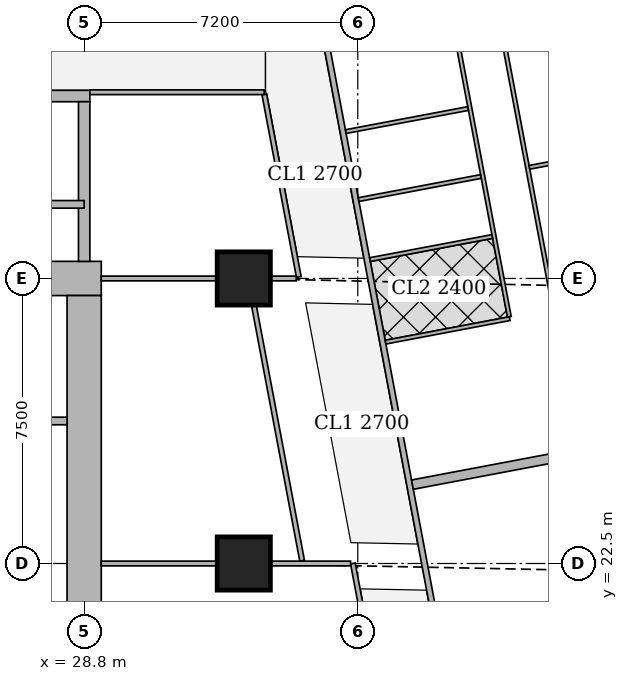
"""IFC4 building model, lengths in metres.
Left out: names, types, materials, properties, quantities, classifications, styles, units other than length and angle.
Written with IfcOpenShell. Run it as: python <this file> out.ifc"""

import sys

from ifc_helpers import new_model, si_unit, direction, frame, frame_2d, origin, origin_2d, place, context, subcontext, project, spatial, rectangle, extrude, element, fill, save


model = new_model("IFC4")
c1 = context("Model", 3, precision=1e-05, world=origin(), true_north=direction((0.0, 1.0)))
c2 = subcontext(c1, "Body", "Model", "MODEL_VIEW")
j1 = project(units=[si_unit("LENGTHUNIT", "METRE"), si_unit("PLANEANGLEUNIT", "RADIAN")], contexts=[c1])
p1 = place(None, origin())
s1 = spatial("IfcSite", under=j1, at=p1, CompositionType="ELEMENT")
p2 = place(p1, origin())
s2 = spatial("IfcBuilding", under=s1, at=p2, CompositionType="ELEMENT")
p3 = place(p2, frame((0.0, 0.0, 193.7)))
s3 = spatial("IfcBuildingStorey", under=s2, at=p3, CompositionType="ELEMENT", Elevation=193.7)
for number, where, z_axis, x_axis in (
    (1, (33.0, 22.5, 0.0), (0.0, 0.0, 1.0), (1.0, 0.0, 0.0)),
    (2, (33.0, 30.0, 0.0), (0.0, 0.0, 1.0), (1.0, 0.0, 0.0)),
):
    element("IfcColumn", number, at=place(p3, frame(where, z_axis=z_axis, x_axis=x_axis)), inside=s3, PredefinedType="COLUMN", context=c2, shape_type="SweptSolid", body=[
        extrude(rectangle(XDim=1.4, YDim=1.4, at=origin_2d()), origin(), (0.0, 0.0, 1.0), 3.75),
    ])
p4 = place(p3, frame((13.95, 30.0, 0.0), z_axis=(0.0, 0.0, 1.0), x_axis=(1.0, 0.0, 0.0)))
e3 = element("IfcWall", 3, at=p4, inside=s3, PredefinedType="SHEAR", context=c2, shape_type="SweptSolid", body=[
    extrude(rectangle(XDim=15.3, YDim=0.9, at=frame_2d((7.65, 0.0))), origin(), (0.0, 0.0, 1.0), 3.75),
])
p5 = place(p4, frame((4.45, 0.0, 0.0)))
e4 = element("IfcOpeningElement", 4, at=p5, cuts=e3, PredefinedType="OPENING", context=c2, shape_type="SweptSolid", body=[
    extrude(rectangle(XDim=1.8, YDim=2.1, at=frame_2d((0.9, 1.05))), frame((0.0, 0.46, 0.0), z_axis=(0.0, -1.0, 0.0), x_axis=(1.0, 0.0, 0.0)), (0.0, 0.0, 1.0), 0.92),
])
p6 = place(p4, frame((10.7, 0.0, 0.0)))
e5 = element("IfcOpeningElement", 5, at=p6, cuts=e3, PredefinedType="OPENING", context=c2, shape_type="SweptSolid", body=[
    extrude(rectangle(XDim=1.1, YDim=2.1, at=frame_2d((0.55, 1.05))), frame((0.0, 0.46, 0.0), z_axis=(0.0, -1.0, 0.0), x_axis=(1.0, 0.0, 0.0)), (0.0, 0.0, 1.0), 0.92),
])
p7 = place(p3, frame((28.8, 15.45, 0.0), z_axis=(0.0, 0.0, 1.0), x_axis=(0.0, 1.0, 0.0)))
e6 = element("IfcWall", 6, at=p7, inside=s3, PredefinedType="SHEAR", context=c2, shape_type="SweptSolid", body=[
    extrude(rectangle(XDim=14.1, YDim=0.9, at=frame_2d((7.05, 0.0))), origin(), (0.0, 0.0, 1.0), 3.75),
])
p8 = place(p3, frame((21.45, 34.8, 0.0), z_axis=(0.0, 0.0, 1.0), x_axis=(1.0, 0.0, 0.0)))
e7 = element("IfcWall", 7, at=p8, inside=s3, PredefinedType="SHEAR", context=c2, shape_type="SweptSolid", body=[
    extrude(rectangle(XDim=7.5, YDim=0.3, at=frame_2d((3.75, 0.0))), origin(), (0.0, 0.0, 1.0), 3.75),
])
p9 = place(p8, frame((0.5, 0.0, 0.0)))
e8 = element("IfcOpeningElement", 8, at=p9, cuts=e7, PredefinedType="OPENING", context=c2, shape_type="SweptSolid", body=[
    extrude(rectangle(XDim=1.1, YDim=2.1, at=frame_2d((0.55, 1.05))), frame((0.0, 0.16, 0.0), z_axis=(0.0, -1.0, 0.0), x_axis=(1.0, 0.0, 0.0)), (0.0, 0.0, 1.0), 0.32),
])
p10 = place(p3, frame((28.8, 30.45, 0.0), z_axis=(0.0, 0.0, 1.0), x_axis=(0.0, 1.0, 0.0)))
e9 = element("IfcWall", 9, at=p10, inside=s3, PredefinedType="SHEAR", context=c2, shape_type="SweptSolid", body=[
    extrude(rectangle(XDim=4.2, YDim=0.3, at=frame_2d((2.1, 0.0))), origin(), (0.0, 0.0, 1.0), 3.75),
])
p11 = place(p3, frame((33.933, 42.73, 0.0), z_axis=(0.0, 0.0, 1.0), x_axis=(0.185595417643, -0.982626246825, 0.0)))
e10 = element("IfcWall", 10, at=p11, inside=s3, PredefinedType="SOLIDWALL", context=c2, shape_type="SweptSolid", body=[
    extrude(rectangle(XDim=41.051, YDim=0.15, at=frame_2d((20.525, 0.0))), origin(), (0.0, 0.0, 1.0), 2.5),
])
p12 = place(p11, frame((16.082, 0.0, 0.0)))
e11 = element("IfcOpeningElement", 11, at=p12, cuts=e10, PredefinedType="OPENING", context=c2, shape_type="SweptSolid", body=[
    extrude(rectangle(XDim=1.0, YDim=2.1, at=frame_2d((0.5, 1.05))), frame((0.0, 0.085, 0.0), z_axis=(0.0, -1.0, 0.0), x_axis=(1.0, 0.0, 0.0)), (0.0, 0.0, 1.0), 0.17),
])
p13 = place(p11, frame((19.898, 0.0, 0.0)))
e12 = element("IfcOpeningElement", 12, at=p13, cuts=e10, PredefinedType="OPENING", context=c2, shape_type="SweptSolid", body=[
    extrude(rectangle(XDim=1.0, YDim=2.1, at=frame_2d((0.5, 1.05))), frame((0.0, 0.085, 0.0), z_axis=(0.0, -1.0, 0.0), x_axis=(1.0, 0.0, 0.0)), (0.0, 0.0, 1.0), 0.17),
])
p14 = place(p11, frame((30.862, 0.0, 0.0)))
e13 = element("IfcOpeningElement", 13, at=p14, cuts=e10, PredefinedType="OPENING", context=c2, shape_type="SweptSolid", body=[
    extrude(rectangle(XDim=1.0, YDim=2.1, at=frame_2d((0.5, 1.05))), frame((0.0, 0.085, 0.0), z_axis=(0.0, -1.0, 0.0), x_axis=(1.0, 0.0, 0.0)), (0.0, 0.0, 1.0), 0.17),
])
p15 = place(p3, frame((38.764, 41.941, 0.0), z_axis=(0.0, 0.0, 1.0), x_axis=(0.185512176227, -0.982641965556, 0.0)))
e14 = element("IfcWall", 14, at=p15, inside=s3, PredefinedType="PARTITIONING", context=c2, shape_type="SweptSolid", body=[
    extrude(rectangle(XDim=12.792, YDim=0.1, at=frame_2d((6.396, 0.0))), origin(), (0.0, 0.0, 1.0), 2.5),
])
p16 = place(p15, frame((11.35, 0.0, 0.0)))
e15 = element("IfcOpeningElement", 15, at=p16, cuts=e14, PredefinedType="OPENING", context=c2, shape_type="SweptSolid", body=[
    extrude(rectangle(XDim=0.9, YDim=2.1, at=frame_2d((0.45, 1.05))), frame((0.0, 0.06, 0.0), z_axis=(0.0, -1.0, 0.0), x_axis=(1.0, 0.0, 0.0)), (0.0, 0.0, 1.0), 0.12),
])
p17 = place(p15, frame((8.085, 0.0, 0.0)))
e16 = element("IfcOpeningElement", 16, at=p17, cuts=e14, PredefinedType="OPENING", context=c2, shape_type="SweptSolid", body=[
    extrude(rectangle(XDim=0.9, YDim=2.1, at=frame_2d((0.45, 1.05))), frame((0.0, 0.06, 0.0), z_axis=(0.0, -1.0, 0.0), x_axis=(1.0, 0.0, 0.0)), (0.0, 0.0, 1.0), 0.12),
])
p18 = place(p15, frame((3.7, 0.0, 0.0)))
e17 = element("IfcOpeningElement", 17, at=p18, cuts=e14, PredefinedType="OPENING", context=c2, shape_type="SweptSolid", body=[
    extrude(rectangle(XDim=0.9, YDim=2.1, at=frame_2d((0.45, 1.05))), frame((0.0, 0.06, 0.0), z_axis=(0.0, -1.0, 0.0), x_axis=(1.0, 0.0, 0.0)), (0.0, 0.0, 1.0), 0.12),
])
p19 = place(p3, frame((37.473, 42.309, 0.0), z_axis=(0.0, 0.0, 1.0), x_axis=(0.185570636839, -0.982630927024, 0.0)))
e18 = element("IfcWall", 18, at=p19, inside=s3, PredefinedType="PARTITIONING", context=c2, shape_type="SweptSolid", body=[
    extrude(rectangle(XDim=13.553, YDim=0.1, at=frame_2d((6.777, 0.0))), origin(), (0.0, 0.0, 1.0), 2.5),
])
p20 = place(p19, frame((12.049, 0.0, 0.0)))
e19 = element("IfcOpeningElement", 19, at=p20, cuts=e18, PredefinedType="OPENING", context=c2, shape_type="SweptSolid", body=[
    extrude(rectangle(XDim=0.9, YDim=2.1, at=frame_2d((0.45, 1.05))), frame((0.0, 0.06, 0.0), z_axis=(0.0, -1.0, 0.0), x_axis=(1.0, 0.0, 0.0)), (0.0, 0.0, 1.0), 0.12),
])
p21 = place(p19, frame((8.427, 0.0, 0.0)))
e20 = element("IfcOpeningElement", 20, at=p21, cuts=e18, PredefinedType="OPENING", context=c2, shape_type="SweptSolid", body=[
    extrude(rectangle(XDim=0.9, YDim=2.1, at=frame_2d((0.45, 1.05))), frame((0.0, 0.06, 0.0), z_axis=(0.0, -1.0, 0.0), x_axis=(1.0, 0.0, 0.0)), (0.0, 0.0, 1.0), 0.12),
])
p22 = place(p19, frame((2.853, 0.0, 0.0)))
e21 = element("IfcOpeningElement", 21, at=p22, cuts=e18, PredefinedType="OPENING", context=c2, shape_type="SweptSolid", body=[
    extrude(rectangle(XDim=0.9, YDim=2.1, at=frame_2d((0.45, 1.05))), frame((0.0, 0.06, 0.0), z_axis=(0.0, -1.0, 0.0), x_axis=(1.0, 0.0, 0.0)), (0.0, 0.0, 1.0), 0.12),
])
p23 = place(p19, frame((10.14, 0.0, 0.0)))
e22 = element("IfcOpeningElement", 22, at=p23, cuts=e18, PredefinedType="OPENING", context=c2, shape_type="SweptSolid", body=[
    extrude(rectangle(XDim=0.9, YDim=2.1, at=frame_2d((0.45, 1.05))), frame((0.0, 0.06, 0.0), z_axis=(0.0, -1.0, 0.0), x_axis=(1.0, 0.0, 0.0)), (0.0, 0.0, 1.0), 0.12),
])
p24 = place(p19, frame((5.759, 0.0, 0.0)))
e23 = element("IfcOpeningElement", 23, at=p24, cuts=e18, PredefinedType="OPENING", context=c2, shape_type="SweptSolid", body=[
    extrude(rectangle(XDim=0.9, YDim=2.1, at=frame_2d((0.45, 1.05))), frame((0.0, 0.06, 0.0), z_axis=(0.0, -1.0, 0.0), x_axis=(1.0, 0.0, 0.0)), (0.0, 0.0, 1.0), 0.12),
])
p25 = place(p3, frame((44.693, 33.713, 0.0), z_axis=(0.0, 0.0, 1.0), x_axis=(-0.982623519589, -0.185609856287, 0.0)))
e24 = element("IfcWall", 24, at=p25, inside=s3, PredefinedType="PARTITIONING", context=c2, shape_type="SweptSolid", body=[
    extrude(rectangle(XDim=4.25, YDim=0.1, at=frame_2d((2.125, 0.0))), origin(), (0.0, 0.0, 1.0), 2.05),
])
p26 = place(p3, frame((39.24, 32.683, 0.0), z_axis=(0.0, 0.0, 1.0), x_axis=(-0.982607026909, -0.185697147715, 0.0)))
e25 = element("IfcWall", 25, at=p26, inside=s3, PredefinedType="PARTITIONING", context=c2, shape_type="SweptSolid", body=[
    extrude(rectangle(XDim=3.275, YDim=0.1, at=frame_2d((1.637, 0.0))), origin(), (0.0, 0.0, 1.0), 3.5),
])
p27 = place(p3, frame((39.997, 28.942, 0.0), z_axis=(0.0, 0.0, 1.0), x_axis=(-0.982569883123, -0.185893584556, 0.0)))
e26 = element("IfcWall", 26, at=p27, inside=s3, PredefinedType="PARTITIONING", context=c2, shape_type="SweptSolid", body=[
    extrude(rectangle(XDim=3.324, YDim=0.1, at=frame_2d((1.662, 0.0))), origin(), (0.0, 0.0, 1.0), 3.5),
])
p28 = place(p3, frame((39.538, 31.104, 0.0), z_axis=(0.0, 0.0, 1.0), x_axis=(-0.982620626894, -0.185625169636, 0.0)))
e27 = element("IfcWall", 27, at=p28, inside=s3, PredefinedType="PARTITIONING", context=c2, shape_type="SweptSolid", body=[
    extrude(rectangle(XDim=3.275, YDim=0.1, at=frame_2d((1.637, 0.0))), origin(), (0.0, 0.0, 1.0), 2.5),
])
p29 = place(p3, frame((38.902, 34.471, 0.0), z_axis=(0.0, 0.0, 1.0), x_axis=(-0.982674977865, -0.185337227447, 0.0)))
e28 = element("IfcWall", 28, at=p29, inside=s3, PredefinedType="PARTITIONING", context=c2, shape_type="SweptSolid", body=[
    extrude(rectangle(XDim=3.275, YDim=0.1, at=frame_2d((1.637, 0.0))), origin(), (0.0, 0.0, 1.0), 3.5),
])
p30 = place(p3, frame((41.885, 25.415, 0.0), z_axis=(0.0, 0.0, 1.0), x_axis=(-0.982612837616, -0.185666398014, 0.0)))
e29 = element("IfcWall", 29, at=p30, inside=s3, PredefinedType="SOLIDWALL", context=c2, shape_type="SweptSolid", body=[
    extrude(rectangle(XDim=4.525, YDim=0.25, at=frame_2d((2.262, 0.0))), origin(), (0.0, 0.0, 1.0), 3.5),
])
p31 = place(p3, frame((28.95, 34.9, 0.0), z_axis=(0.0, 0.0, 1.0), x_axis=(1.0, 0.0, 0.0)))
e30 = element("IfcWall", 30, at=p31, inside=s3, PredefinedType="PARTITIONING", context=c2, shape_type="SweptSolid", body=[
    extrude(rectangle(XDim=4.588, YDim=0.125, at=frame_2d((2.294, 0.0))), origin(), (0.0, 0.0, 1.0), 3.5),
])
p32 = place(p3, frame((38.202, 10.163, 0.0), z_axis=(0.0, 0.0, 1.0), x_axis=(-0.185645577403, 0.982616771479, 0.0)))
e31 = element("IfcWall", 31, at=p32, inside=s3, PredefinedType="PARTITIONING", context=c2, shape_type="SweptSolid", body=[
    extrude(rectangle(XDim=12.555, YDim=0.125, at=frame_2d((6.278, 0.0))), origin(), (0.0, 0.0, 1.0), 2.5),
])
p33 = place(p32, frame((0.708, 0.0, 0.0)))
e32 = element("IfcOpeningElement", 32, at=p33, cuts=e31, PredefinedType="OPENING", context=c2, shape_type="SweptSolid", body=[
    extrude(rectangle(XDim=1.0, YDim=2.1, at=frame_2d((0.5, 1.05))), frame((0.0, 0.073, 0.0), z_axis=(0.0, -1.0, 0.0), x_axis=(1.0, 0.0, 0.0)), (0.0, 0.0, 1.0), 0.145),
])
p34 = place(p32, frame((5.9, 0.0, 0.0)))
e33 = element("IfcOpeningElement", 33, at=p34, cuts=e31, PredefinedType="OPENING", context=c2, shape_type="SweptSolid", body=[
    extrude(rectangle(XDim=1.0, YDim=2.1, at=frame_2d((0.5, 1.05))), frame((0.0, 0.073, 0.0), z_axis=(0.0, -1.0, 0.0), x_axis=(1.0, 0.0, 0.0)), (0.0, 0.0, 1.0), 0.145),
])
p35 = place(p32, frame((9.562, 0.0, 0.0)))
e34 = element("IfcOpeningElement", 34, at=p35, cuts=e31, PredefinedType="OPENING", context=c2, shape_type="SweptSolid", body=[
    extrude(rectangle(XDim=1.0, YDim=2.1, at=frame_2d((0.5, 1.05))), frame((0.0, 0.073, 0.0), z_axis=(0.0, -1.0, 0.0), x_axis=(1.0, 0.0, 0.0)), (0.0, 0.0, 1.0), 0.145),
])
p36 = place(p3, frame((34.448, 30.04, 0.0), z_axis=(0.0, 0.0, 1.0), x_axis=(-0.185749459238, 0.982597139418, 0.0)))
e35 = element("IfcWall", 35, at=p36, inside=s3, PredefinedType="PARTITIONING", context=c2, shape_type="SweptSolid", body=[
    extrude(rectangle(XDim=4.883, YDim=0.125, at=frame_2d((2.441, 0.0))), origin(), (0.0, 0.0, 1.0), 2.5),
])
p37 = place(p36, frame((0.95, 0.0, 0.0)))
e36 = element("IfcOpeningElement", 36, at=p37, cuts=e35, PredefinedType="OPENING", context=c2, shape_type="SweptSolid", body=[
    extrude(rectangle(XDim=1.0, YDim=2.1, at=frame_2d((0.5, 1.05))), frame((0.0, 0.073, 0.0), z_axis=(0.0, -1.0, 0.0), x_axis=(1.0, 0.0, 0.0)), (0.0, 0.0, 1.0), 0.145),
])
p38 = place(p3, frame((34.535, 22.574, 0.0), z_axis=(0.0, 0.0, 1.0), x_axis=(-0.185576487128, 0.982629822174, 0.0)))
e37 = element("IfcWall", 37, at=p38, inside=s3, PredefinedType="PARTITIONING", context=c2, shape_type="SweptSolid", body=[
    extrude(rectangle(XDim=6.832, YDim=0.125, at=frame_2d((3.416, 0.0))), origin(), (0.0, 0.0, 1.0), 2.5),
])
p39 = place(p38, frame((3.241, 0.0, 0.0)))
e38 = element("IfcOpeningElement", 38, at=p39, cuts=e37, PredefinedType="OPENING", context=c2, shape_type="SweptSolid", body=[
    extrude(rectangle(XDim=1.0, YDim=2.1, at=frame_2d((0.5, 1.05))), frame((0.0, 0.073, 0.0), z_axis=(0.0, -1.0, 0.0), x_axis=(1.0, 0.0, 0.0)), (0.0, 0.0, 1.0), 0.145),
])
p40 = place(p3, frame((29.25, 22.5, 0.0), z_axis=(0.0, 0.0, 1.0), x_axis=(1.0, 0.0, 0.0)))
e39 = element("IfcWall", 39, at=p40, inside=s3, PredefinedType="PARTITIONING", context=c2, shape_type="SweptSolid", body=[
    extrude(rectangle(XDim=3.049, YDim=0.125, at=frame_2d((1.524, 0.0))), origin(), (0.0, 0.0, 1.0), 3.5),
])
p41 = place(p3, frame((33.701, 22.5, 0.0), z_axis=(0.0, 0.0, 1.0), x_axis=(1.0, 0.0, 0.0)))
e40 = element("IfcWall", 40, at=p41, inside=s3, PredefinedType="PARTITIONING", context=c2, shape_type="SweptSolid", body=[
    extrude(rectangle(XDim=2.109, YDim=0.125, at=frame_2d((1.055, 0.0))), origin(), (0.0, 0.0, 1.0), 2.5),
])
p42 = place(p3, frame((29.25, 30.0, 0.0), z_axis=(0.0, 0.0, 1.0), x_axis=(1.0, 0.0, 0.0)))
e41 = element("IfcWall", 41, at=p42, inside=s3, PredefinedType="PARTITIONING", context=c2, shape_type="SweptSolid", body=[
    extrude(rectangle(XDim=3.049, YDim=0.125, at=frame_2d((1.524, 0.0))), origin(), (0.0, 0.0, 1.0), 3.5),
])
p43 = place(p3, frame((33.701, 30.0, 0.0), z_axis=(0.0, 0.0, 1.0), x_axis=(1.0, 0.0, 0.0)))
e42 = element("IfcWall", 42, at=p43, inside=s3, PredefinedType="PARTITIONING", context=c2, shape_type="SweptSolid", body=[
    extrude(rectangle(XDim=0.679, YDim=0.125, at=frame_2d((0.339, 0.0))), origin(), (0.0, 0.0, 1.0), 2.5),
])
p44 = place(p3, frame((23.0, 31.95, 0.0), z_axis=(0.0, 0.0, 1.0), x_axis=(1.0, 0.0, 0.0)))
e43 = element("IfcWall", 43, at=p44, inside=s3, PredefinedType="SHEAR", context=c2, shape_type="SweptSolid", body=[
    extrude(rectangle(XDim=5.8, YDim=0.2, at=frame_2d((2.9, 0.0))), origin(), (0.0, 0.0, 1.0), 3.75),
])
p45 = place(p3, frame((27.4, 26.25, 0.0), z_axis=(0.0, 0.0, 1.0), x_axis=(1.0, 0.0, 0.0)))
e44 = element("IfcWall", 44, at=p45, inside=s3, PredefinedType="SOLIDWALL", context=c2, shape_type="SweptSolid", body=[
    extrude(rectangle(XDim=0.95, YDim=0.2, at=frame_2d((0.475, 0.0))), origin(), (0.0, 0.0, 1.0), 3.5),
])
p46 = place(p16, origin())
e45 = element("IfcDoor", 45, at=p46, inside=s3, OperationType="SINGLE_SWING_RIGHT", PredefinedType="DOOR", context=c2, shape_type="SweptSolid", body=[
    extrude(rectangle(XDim=0.9, YDim=2.1, at=frame_2d((0.45, 1.05))), frame((0.0, 0.025, 0.0), z_axis=(0.0, -1.0, 0.0), x_axis=(1.0, 0.0, 0.0)), (0.0, 0.0, 1.0), 0.05),
])
fill(e15, e45)
p47 = place(p17, origin())
e46 = element("IfcDoor", 46, at=p47, inside=s3, OperationType="SINGLE_SWING_RIGHT", PredefinedType="DOOR", context=c2, shape_type="SweptSolid", body=[
    extrude(rectangle(XDim=0.9, YDim=2.1, at=frame_2d((0.45, 1.05))), frame((0.0, 0.025, 0.0), z_axis=(0.0, -1.0, 0.0), x_axis=(1.0, 0.0, 0.0)), (0.0, 0.0, 1.0), 0.05),
])
fill(e16, e46)
p48 = place(p20, origin())
e47 = element("IfcDoor", 47, at=p48, inside=s3, OperationType="SINGLE_SWING_LEFT", PredefinedType="DOOR", context=c2, shape_type="SweptSolid", body=[
    extrude(rectangle(XDim=0.9, YDim=2.1, at=frame_2d((0.45, 1.05))), frame((0.0, 0.025, 0.0), z_axis=(0.0, -1.0, 0.0), x_axis=(1.0, 0.0, 0.0)), (0.0, 0.0, 1.0), 0.05),
])
fill(e19, e47)
p49 = place(p21, origin())
e48 = element("IfcDoor", 48, at=p49, inside=s3, OperationType="SINGLE_SWING_RIGHT", PredefinedType="DOOR", context=c2, shape_type="SweptSolid", body=[
    extrude(rectangle(XDim=0.9, YDim=2.1, at=frame_2d((0.45, 1.05))), frame((0.0, 0.025, 0.0), z_axis=(0.0, -1.0, 0.0), x_axis=(1.0, 0.0, 0.0)), (0.0, 0.0, 1.0), 0.05),
])
fill(e20, e48)
p50 = place(p23, origin())
e49 = element("IfcDoor", 49, at=p50, inside=s3, OperationType="SINGLE_SWING_LEFT", PredefinedType="DOOR", context=c2, shape_type="SweptSolid", body=[
    extrude(rectangle(XDim=0.9, YDim=2.1, at=frame_2d((0.45, 1.05))), frame((0.0, 0.025, 0.0), z_axis=(0.0, -1.0, 0.0), x_axis=(1.0, 0.0, 0.0)), (0.0, 0.0, 1.0), 0.05),
])
fill(e22, e49)
p51 = place(p24, origin())
e50 = element("IfcDoor", 50, at=p51, inside=s3, OperationType="SINGLE_SWING_LEFT", PredefinedType="DOOR", context=c2, shape_type="SweptSolid", body=[
    extrude(rectangle(XDim=0.9, YDim=2.1, at=frame_2d((0.45, 1.05))), frame((0.0, 0.025, 0.0), z_axis=(0.0, -1.0, 0.0), x_axis=(1.0, 0.0, 0.0)), (0.0, 0.0, 1.0), 0.05),
])
fill(e23, e50)
p52 = place(p12, origin())
e51 = element("IfcDoor", 51, at=p52, inside=s3, OperationType="SINGLE_SWING_LEFT", PredefinedType="DOOR", context=c2, shape_type="SweptSolid", body=[
    extrude(rectangle(XDim=1.0, YDim=2.1, at=frame_2d((0.5, 1.05))), frame((0.0, 0.025, 0.0), z_axis=(0.0, -1.0, 0.0), x_axis=(1.0, 0.0, 0.0)), (0.0, 0.0, 1.0), 0.05),
])
fill(e11, e51)
p53 = place(p13, origin())
e52 = element("IfcDoor", 52, at=p53, inside=s3, OperationType="SINGLE_SWING_RIGHT", PredefinedType="DOOR", context=c2, shape_type="SweptSolid", body=[
    extrude(rectangle(XDim=1.0, YDim=2.1, at=frame_2d((0.5, 1.05))), frame((0.0, 0.025, 0.0), z_axis=(0.0, -1.0, 0.0), x_axis=(1.0, 0.0, 0.0)), (0.0, 0.0, 1.0), 0.05),
])
fill(e12, e52)
p54 = place(p39, origin())
e53 = element("IfcDoor", 53, at=p54, inside=s3, OperationType="SINGLE_SWING_RIGHT", PredefinedType="DOOR", context=c2, shape_type="SweptSolid", body=[
    extrude(rectangle(XDim=1.0, YDim=2.1, at=frame_2d((0.5, 1.05))), frame((0.0, 0.025, 0.0), z_axis=(0.0, -1.0, 0.0), x_axis=(1.0, 0.0, 0.0)), (0.0, 0.0, 1.0), 0.05),
])
fill(e38, e53)
p55 = place(p37, origin())
e54 = element("IfcDoor", 54, at=p55, inside=s3, OperationType="SINGLE_SWING_LEFT", PredefinedType="DOOR", context=c2, shape_type="SweptSolid", body=[
    extrude(rectangle(XDim=1.0, YDim=2.1, at=frame_2d((0.5, 1.05))), frame((0.0, 0.025, 0.0), z_axis=(0.0, -1.0, 0.0), x_axis=(1.0, 0.0, 0.0)), (0.0, 0.0, 1.0), 0.05),
])
fill(e36, e54)
save(model, sys.argv[1])
